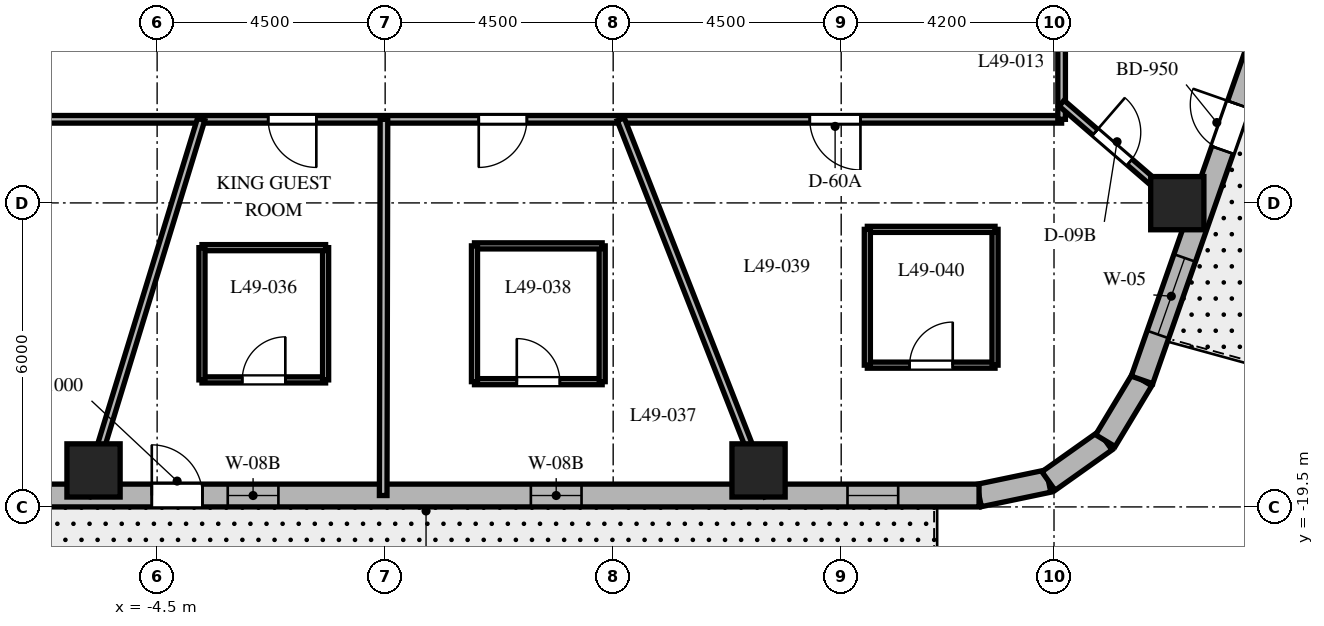
"""IFC4 building model, lengths in metres.
Left out: names, types, materials, properties, quantities, classifications, styles, units other than length and angle.
Written with IfcOpenShell. Run it as: python <this file> out.ifc"""

import sys

from ifc_helpers import new_model, si_unit, direction, frame, frame_2d, origin, origin_2d, place, context, subcontext, project, spatial, rectangle, extrude, element, fill, save


model = new_model("IFC4")
c1 = context("Model", 3, precision=1e-05, world=origin(), true_north=direction((0.0, 1.0)))
c2 = subcontext(c1, "Body", "Model", "MODEL_VIEW")
j1 = project(units=[si_unit("LENGTHUNIT", "METRE"), si_unit("PLANEANGLEUNIT", "RADIAN")], contexts=[c1])
p1 = place(None, origin())
s1 = spatial("IfcSite", under=j1, at=p1, CompositionType="ELEMENT")
p2 = place(p1, origin())
s2 = spatial("IfcBuilding", under=s1, at=p2, CompositionType="ELEMENT")
p3 = place(p2, frame((0.0, 0.0, 197.8)))
s3 = spatial("IfcBuildingStorey", under=s2, at=p3, CompositionType="ELEMENT", Elevation=197.8)
for number, where, z_axis, x_axis in (
    (1, (-5.755, -18.78, 0.0), (0.0, 0.0, 1.0), (1.0, 0.0, 0.0)),
    (2, (7.369, -18.78, 0.0), (0.0, 0.0, 1.0), (1.0, 0.0, 0.0)),
    (3, (15.633, -13.505, 0.0), (0.0, 0.0, 1.0), (1.0, 0.0, 0.0)),
):
    element("IfcColumn", number, at=place(p3, frame(where, z_axis=z_axis, x_axis=x_axis)), inside=s3, PredefinedType="COLUMN", context=c2, shape_type="SweptSolid", body=[
        extrude(rectangle(XDim=1.05, YDim=1.05, at=origin_2d()), origin(), (0.0, 0.0, 1.0), 3.7),
    ])
p4 = place(p3, frame((11.72, -19.275, 0.0), z_axis=(0.0, 0.0, 1.0), x_axis=(0.97893106758, 0.204191001093, 0.0)))
e4 = element("IfcWall", 4, at=p4, inside=s3, PredefinedType="SOLIDWALL", context=c2, shape_type="SweptSolid", body=[
    extrude(rectangle(XDim=1.4, YDim=0.45, at=frame_2d((0.7, 0.0))), origin(), (0.0, 0.0, 1.0), 3.35),
])
p5 = place(p3, frame((13.091, -18.989, 0.0), z_axis=(0.0, 0.0, 1.0), x_axis=(0.815574637848, 0.578651890258, 0.0)))
e5 = element("IfcWall", 5, at=p5, inside=s3, PredefinedType="SOLIDWALL", context=c2, shape_type="SweptSolid", body=[
    extrude(rectangle(XDim=1.377, YDim=0.45, at=frame_2d((0.688, 0.0))), origin(), (0.0, 0.0, 1.0), 3.35),
])
p6 = place(p3, frame((14.214, -18.192, 0.0), z_axis=(0.0, 0.0, 1.0), x_axis=(0.516340945502, 0.856383108193, 0.0)))
e6 = element("IfcWall", 6, at=p6, inside=s3, PredefinedType="SOLIDWALL", context=c2, shape_type="SweptSolid", body=[
    extrude(rectangle(XDim=1.4, YDim=0.45, at=frame_2d((0.7, 0.0))), origin(), (0.0, 0.0, 1.0), 3.35),
])
p7 = place(p3, frame((-10.108, -19.275, 0.0), z_axis=(0.0, 0.0, 1.0), x_axis=(1.0, 0.0, 0.0)))
e7 = element("IfcWall", 7, at=p7, inside=s3, PredefinedType="SOLIDWALL", context=c2, shape_type="SweptSolid", body=[
    extrude(rectangle(XDim=21.829, YDim=0.45, at=frame_2d((10.915, 0.0))), origin(), (0.0, 0.0, 1.0), 3.35),
])
p8 = place(p7, frame((5.503, 0.0, 0.0)))
e8 = element("IfcOpeningElement", 8, at=p8, cuts=e7, PredefinedType="OPENING", context=c2, shape_type="SweptSolid", body=[
    extrude(rectangle(XDim=1.0, YDim=2.15, at=frame_2d((0.5, 1.075))), frame((0.0, 0.235, 0.0), z_axis=(0.0, -1.0, 0.0), x_axis=(1.0, 0.0, 0.0)), (0.0, 0.0, 1.0), 0.47),
])
p9 = place(p7, frame((1.597, 0.0, 0.8)))
e9 = element("IfcOpeningElement", 9, at=p9, cuts=e7, PredefinedType="OPENING", context=c2, shape_type="SweptSolid", body=[
    extrude(rectangle(XDim=1.0, YDim=1.35, at=frame_2d((0.5, 0.675))), frame((0.0, 0.235, 0.0), z_axis=(0.0, -1.0, 0.0), x_axis=(1.0, 0.0, 0.0)), (0.0, 0.0, 1.0), 0.47),
])
p10 = place(p7, frame((7.002, 0.0, 0.8)))
e10 = element("IfcOpeningElement", 10, at=p10, cuts=e7, PredefinedType="OPENING", context=c2, shape_type="SweptSolid", body=[
    extrude(rectangle(XDim=1.0, YDim=1.35, at=frame_2d((0.5, 0.675))), frame((0.0, 0.235, 0.0), z_axis=(0.0, -1.0, 0.0), x_axis=(1.0, 0.0, 0.0)), (0.0, 0.0, 1.0), 0.47),
])
p11 = place(p7, frame((12.984, 0.0, 0.8)))
e11 = element("IfcOpeningElement", 11, at=p11, cuts=e7, PredefinedType="OPENING", context=c2, shape_type="SweptSolid", body=[
    extrude(rectangle(XDim=1.0, YDim=1.35, at=frame_2d((0.5, 0.675))), frame((0.0, 0.235, 0.0), z_axis=(0.0, -1.0, 0.0), x_axis=(1.0, 0.0, 0.0)), (0.0, 0.0, 1.0), 0.47),
])
p12 = place(p7, frame((19.233, 0.0, 0.8)))
e12 = element("IfcOpeningElement", 12, at=p12, cuts=e7, PredefinedType="OPENING", context=c2, shape_type="SweptSolid", body=[
    extrude(rectangle(XDim=1.0, YDim=1.35, at=frame_2d((0.5, 0.675))), frame((0.0, 0.235, 0.0), z_axis=(0.0, -1.0, 0.0), x_axis=(1.0, 0.0, 0.0)), (0.0, 0.0, 1.0), 0.47),
])
p13 = place(p3, frame((14.937, -16.993, 0.0), z_axis=(0.0, 0.0, 1.0), x_axis=(0.330431575061, 0.943829949834, 0.0)))
e13 = element("IfcWall", 13, at=p13, inside=s3, PredefinedType="SOLIDWALL", context=c2, shape_type="SweptSolid", body=[
    extrude(rectangle(XDim=17.689, YDim=0.45, at=frame_2d((8.844, 0.0))), origin(), (0.0, 0.0, 1.0), 3.35),
])
p14 = place(p13, frame((4.807, 0.0, 0.0)))
e14 = element("IfcOpeningElement", 14, at=p14, cuts=e13, PredefinedType="OPENING", context=c2, shape_type="SweptSolid", body=[
    extrude(rectangle(XDim=0.95, YDim=2.15, at=frame_2d((0.475, 1.075))), frame((0.0, 0.235, 0.0), z_axis=(0.0, -1.0, 0.0), x_axis=(1.0, 0.0, 0.0)), (0.0, 0.0, 1.0), 0.47),
])
p15 = place(p13, frame((0.95, 0.0, 0.8)))
e15 = element("IfcOpeningElement", 15, at=p15, cuts=e13, PredefinedType="OPENING", context=c2, shape_type="SweptSolid", body=[
    extrude(rectangle(XDim=1.6, YDim=1.75, at=frame_2d((0.8, 0.875))), frame((0.0, 0.235, 0.0), z_axis=(0.0, -1.0, 0.0), x_axis=(1.0, 0.0, 0.0)), (0.0, 0.0, 1.0), 0.47),
])
p16 = place(p13, frame((7.99, 0.0, 0.8)))
e16 = element("IfcOpeningElement", 16, at=p16, cuts=e13, PredefinedType="OPENING", context=c2, shape_type="SweptSolid", body=[
    extrude(rectangle(XDim=1.6, YDim=1.75, at=frame_2d((0.8, 0.875))), frame((0.0, 0.235, 0.0), z_axis=(0.0, -1.0, 0.0), x_axis=(1.0, 0.0, 0.0)), (0.0, 0.0, 1.0), 0.47),
])
p17 = place(p13, frame((15.084, 0.0, 0.8)))
e17 = element("IfcOpeningElement", 17, at=p17, cuts=e13, PredefinedType="OPENING", context=c2, shape_type="SweptSolid", body=[
    extrude(rectangle(XDim=1.6, YDim=1.75, at=frame_2d((0.8, 0.875))), frame((0.0, 0.235, 0.0), z_axis=(0.0, -1.0, 0.0), x_axis=(1.0, 0.0, 0.0)), (0.0, 0.0, 1.0), 0.47),
])
p18 = place(p3, frame((13.35, -11.85, 0.0), z_axis=(0.0, 0.0, 1.0), x_axis=(-1.0, 0.0, 0.0)))
e18 = element("IfcWall", 18, at=p18, inside=s3, PredefinedType="PARTITIONING", context=c2, shape_type="SweptSolid", body=[
    extrude(rectangle(XDim=26.7, YDim=0.15, at=frame_2d((13.35, 0.0))), origin(), (0.0, 0.0, 1.0), 2.14),
])
p19 = place(p18, frame((20.682, 0.0, 0.0)))
e19 = element("IfcOpeningElement", 19, at=p19, cuts=e18, PredefinedType="OPENING", context=c2, shape_type="SweptSolid", body=[
    extrude(rectangle(XDim=0.95, YDim=2.03, at=frame_2d((0.475, 1.015))), frame((0.0, 0.085, 0.0), z_axis=(0.0, -1.0, 0.0), x_axis=(1.0, 0.0, 0.0)), (0.0, 0.0, 1.0), 0.17),
])
p20 = place(p18, frame((14.708, 0.0, 0.0)))
e20 = element("IfcOpeningElement", 20, at=p20, cuts=e18, PredefinedType="OPENING", context=c2, shape_type="SweptSolid", body=[
    extrude(rectangle(XDim=0.95, YDim=2.03, at=frame_2d((0.475, 1.015))), frame((0.0, 0.085, 0.0), z_axis=(0.0, -1.0, 0.0), x_axis=(1.0, 0.0, 0.0)), (0.0, 0.0, 1.0), 0.17),
])
p21 = place(p18, frame((10.553, 0.0, 0.0)))
e21 = element("IfcOpeningElement", 21, at=p21, cuts=e18, PredefinedType="OPENING", context=c2, shape_type="SweptSolid", body=[
    extrude(rectangle(XDim=0.95, YDim=2.03, at=frame_2d((0.475, 1.015))), frame((0.0, 0.085, 0.0), z_axis=(0.0, -1.0, 0.0), x_axis=(1.0, 0.0, 0.0)), (0.0, 0.0, 1.0), 0.17),
])
p22 = place(p18, frame((3.97, 0.0, 0.0)))
e22 = element("IfcOpeningElement", 22, at=p22, cuts=e18, PredefinedType="OPENING", context=c2, shape_type="SweptSolid", body=[
    extrude(rectangle(XDim=1.0, YDim=2.03, at=frame_2d((0.5, 1.015))), frame((0.0, 0.085, 0.0), z_axis=(0.0, -1.0, 0.0), x_axis=(1.0, 0.0, 0.0)), (0.0, 0.0, 1.0), 0.17),
])
p23 = place(p3, frame((13.35, 11.85, 0.0), z_axis=(0.0, 0.0, 1.0), x_axis=(0.0, -1.0, 0.0)))
e23 = element("IfcWall", 23, at=p23, inside=s3, PredefinedType="PARTITIONING", context=c2, shape_type="SweptSolid", body=[
    extrude(rectangle(XDim=23.7, YDim=0.15, at=frame_2d((11.85, 0.0))), origin(), (0.0, 0.0, 1.0), 2.79),
])
p24 = place(p23, frame((9.424, 0.0, 0.0)))
e24 = element("IfcOpeningElement", 24, at=p24, cuts=e23, PredefinedType="OPENING", context=c2, shape_type="SweptSolid", body=[
    extrude(rectangle(XDim=0.95, YDim=2.03, at=frame_2d((0.475, 1.015))), frame((0.0, 0.085, 0.0), z_axis=(0.0, -1.0, 0.0), x_axis=(1.0, 0.0, 0.0)), (0.0, 0.0, 1.0), 0.17),
])
p25 = place(p23, frame((3.765, 0.0, 0.0)))
e25 = element("IfcOpeningElement", 25, at=p25, cuts=e23, PredefinedType="OPENING", context=c2, shape_type="SweptSolid", body=[
    extrude(rectangle(XDim=0.9, YDim=2.03, at=frame_2d((0.45, 1.015))), frame((0.0, 0.085, 0.0), z_axis=(0.0, -1.0, 0.0), x_axis=(1.0, 0.0, 0.0)), (0.0, 0.0, 1.0), 0.17),
])
p26 = place(p23, frame((12.494, 0.0, 0.0)))
e26 = element("IfcOpeningElement", 26, at=p26, cuts=e23, PredefinedType="OPENING", context=c2, shape_type="SweptSolid", body=[
    extrude(rectangle(XDim=0.9, YDim=2.03, at=frame_2d((0.45, 1.015))), frame((0.0, 0.085, 0.0), z_axis=(0.0, -1.0, 0.0), x_axis=(1.0, 0.0, 0.0)), (0.0, 0.0, 1.0), 0.17),
])
p27 = place(p3, frame((-3.631, -11.85, 0.0), z_axis=(0.0, 0.0, 1.0), x_axis=(-0.293007573338, -0.956110120209, 0.0)))
e27 = element("IfcWall", 27, at=p27, inside=s3, PredefinedType="PARTITIONING", context=c2, shape_type="SweptSolid", body=[
    extrude(rectangle(XDim=7.766, YDim=0.15, at=frame_2d((3.883, 0.0))), origin(), (0.0, 0.0, 1.0), 2.14),
])
p28 = place(p3, frame((-0.024, -11.85, 0.0), z_axis=(0.0, 0.0, 1.0), x_axis=(-0.001972901592, -0.999998053828, 0.0)))
e28 = element("IfcWall", 28, at=p28, inside=s3, PredefinedType="PARTITIONING", context=c2, shape_type="SweptSolid", body=[
    extrude(rectangle(XDim=7.425, YDim=0.15, at=frame_2d((3.712, 0.0))), origin(), (0.0, 0.0, 1.0), 2.59),
])
p29 = place(p3, frame((4.65, -11.85, 0.0), z_axis=(0.0, 0.0, 1.0), x_axis=(0.365265947993, -0.930903210456, 0.0)))
e29 = element("IfcWall", 29, at=p29, inside=s3, PredefinedType="PARTITIONING", context=c2, shape_type="SweptSolid", body=[
    extrude(rectangle(XDim=7.976, YDim=0.15, at=frame_2d((3.988, 0.0))), origin(), (0.0, 0.0, 1.0), 2.14),
])
p30 = place(p3, frame((13.35, -11.533, 0.0), z_axis=(0.0, 0.0, 1.0), x_axis=(0.756711647314, -0.65374879183, 0.0)))
e30 = element("IfcWall", 30, at=p30, inside=s3, PredefinedType="PARTITIONING", context=c2, shape_type="SweptSolid", body=[
    extrude(rectangle(XDim=3.55, YDim=0.15, at=frame_2d((1.775, 0.0))), origin(), (0.0, 0.0, 1.0), 2.59),
])
p31 = place(p30, frame((0.875, 0.0, 0.0)))
e31 = element("IfcOpeningElement", 31, at=p31, cuts=e30, PredefinedType="OPENING", context=c2, shape_type="SweptSolid", body=[
    extrude(rectangle(XDim=0.9, YDim=2.03, at=frame_2d((0.45, 1.015))), frame((0.0, 0.085, 0.0), z_axis=(0.0, -1.0, 0.0), x_axis=(1.0, 0.0, 0.0)), (0.0, 0.0, 1.0), 0.17),
])
p32 = place(p3, frame((-3.615, -16.993, 0.0), z_axis=(0.0, 0.0, 1.0), x_axis=(1.0, 0.0, 0.0)))
e32 = element("IfcWall", 32, at=p32, inside=s3, PredefinedType="PARTITIONING", context=c2, shape_type="SweptSolid", body=[
    extrude(rectangle(XDim=2.44, YDim=0.12, at=frame_2d((1.22, 0.0))), origin(), (0.0, 0.0, 1.0), 3.35),
])
p33 = place(p32, frame((0.795, 0.0, 0.0)))
e33 = element("IfcOpeningElement", 33, at=p33, cuts=e32, PredefinedType="OPENING", context=c2, shape_type="SweptSolid", body=[
    extrude(rectangle(XDim=0.85, YDim=2.03, at=frame_2d((0.425, 1.015))), frame((0.0, 0.07, 0.0), z_axis=(0.0, -1.0, 0.0), x_axis=(1.0, 0.0, 0.0)), (0.0, 0.0, 1.0), 0.14),
])
p34 = place(p3, frame((-1.175, -16.993, 0.0), z_axis=(0.0, 0.0, 1.0), x_axis=(0.0, 1.0, 0.0)))
e34 = element("IfcWall", 34, at=p34, inside=s3, PredefinedType="PARTITIONING", context=c2, shape_type="SweptSolid", body=[
    extrude(rectangle(XDim=2.61, YDim=0.12, at=frame_2d((1.305, 0.0))), origin(), (0.0, 0.0, 1.0), 2.791),
])
p35 = place(p3, frame((-1.175, -14.383, 0.0), z_axis=(0.0, 0.0, 1.0), x_axis=(-1.0, 0.0, 0.0)))
e35 = element("IfcWall", 35, at=p35, inside=s3, PredefinedType="PARTITIONING", context=c2, shape_type="SweptSolid", body=[
    extrude(rectangle(XDim=2.44, YDim=0.12, at=frame_2d((1.22, 0.0))), origin(), (0.0, 0.0, 1.0), 3.35),
])
p36 = place(p3, frame((-3.615, -14.383, 0.0), z_axis=(0.0, 0.0, 1.0), x_axis=(0.0, -1.0, 0.0)))
e36 = element("IfcWall", 36, at=p36, inside=s3, PredefinedType="PARTITIONING", context=c2, shape_type="SweptSolid", body=[
    extrude(rectangle(XDim=2.61, YDim=0.12, at=frame_2d((1.305, 0.0))), origin(), (0.0, 0.0, 1.0), 2.791),
])
p37 = place(p3, frame((1.763, -17.028, 0.0), z_axis=(0.0, 0.0, 1.0), x_axis=(1.0, 0.0, 0.0)))
e37 = element("IfcWall", 37, at=p37, inside=s3, PredefinedType="PARTITIONING", context=c2, shape_type="SweptSolid", body=[
    extrude(rectangle(XDim=2.52, YDim=0.12, at=frame_2d((1.26, 0.0))), origin(), (0.0, 0.0, 1.0), 2.14),
])
p38 = place(p37, frame((0.835, 0.0, 0.0)))
e38 = element("IfcOpeningElement", 38, at=p38, cuts=e37, PredefinedType="OPENING", context=c2, shape_type="SweptSolid", body=[
    extrude(rectangle(XDim=0.85, YDim=2.03, at=frame_2d((0.425, 1.015))), frame((0.0, 0.07, 0.0), z_axis=(0.0, -1.0, 0.0), x_axis=(1.0, 0.0, 0.0)), (0.0, 0.0, 1.0), 0.14),
])
p39 = place(p3, frame((4.283, -17.028, 0.0), z_axis=(0.0, 0.0, 1.0), x_axis=(0.0, 1.0, 0.0)))
e39 = element("IfcWall", 39, at=p39, inside=s3, PredefinedType="PARTITIONING", context=c2, shape_type="SweptSolid", body=[
    extrude(rectangle(XDim=2.68, YDim=0.12, at=frame_2d((1.34, 0.0))), origin(), (0.0, 0.0, 1.0), 2.14),
])
p40 = place(p3, frame((4.283, -14.348, 0.0), z_axis=(0.0, 0.0, 1.0), x_axis=(-1.0, 0.0, 0.0)))
e40 = element("IfcWall", 40, at=p40, inside=s3, PredefinedType="PARTITIONING", context=c2, shape_type="SweptSolid", body=[
    extrude(rectangle(XDim=2.52, YDim=0.12, at=frame_2d((1.26, 0.0))), origin(), (0.0, 0.0, 1.0), 2.14),
])
p41 = place(p3, frame((1.763, -14.348, 0.0), z_axis=(0.0, 0.0, 1.0), x_axis=(0.0, -1.0, 0.0)))
e41 = element("IfcWall", 41, at=p41, inside=s3, PredefinedType="PARTITIONING", context=c2, shape_type="SweptSolid", body=[
    extrude(rectangle(XDim=2.68, YDim=0.12, at=frame_2d((1.34, 0.0))), origin(), (0.0, 0.0, 1.0), 2.791),
])
p42 = place(p3, frame((9.516, -16.702, 0.0), z_axis=(0.0, 0.0, 1.0), x_axis=(1.0, 0.0, 0.0)))
e42 = element("IfcWall", 42, at=p42, inside=s3, PredefinedType="PARTITIONING", context=c2, shape_type="SweptSolid", body=[
    extrude(rectangle(XDim=2.52, YDim=0.12, at=frame_2d((1.26, 0.0))), origin(), (0.0, 0.0, 1.0), 2.59),
])
p43 = place(p42, frame((0.835, 0.0, 0.0)))
e43 = element("IfcOpeningElement", 43, at=p43, cuts=e42, PredefinedType="OPENING", context=c2, shape_type="SweptSolid", body=[
    extrude(rectangle(XDim=0.85, YDim=2.03, at=frame_2d((0.425, 1.015))), frame((0.0, 0.07, 0.0), z_axis=(0.0, -1.0, 0.0), x_axis=(1.0, 0.0, 0.0)), (0.0, 0.0, 1.0), 0.14),
])
p44 = place(p3, frame((12.036, -16.702, 0.0), z_axis=(0.0, 0.0, 1.0), x_axis=(0.0, 1.0, 0.0)))
e44 = element("IfcWall", 44, at=p44, inside=s3, PredefinedType="PARTITIONING", context=c2, shape_type="SweptSolid", body=[
    extrude(rectangle(XDim=2.68, YDim=0.12, at=frame_2d((1.34, 0.0))), origin(), (0.0, 0.0, 1.0), 2.59),
])
p45 = place(p3, frame((12.036, -14.022, 0.0), z_axis=(0.0, 0.0, 1.0), x_axis=(-1.0, 0.0, 0.0)))
e45 = element("IfcWall", 45, at=p45, inside=s3, PredefinedType="PARTITIONING", context=c2, shape_type="SweptSolid", body=[
    extrude(rectangle(XDim=2.52, YDim=0.12, at=frame_2d((1.26, 0.0))), origin(), (0.0, 0.0, 1.0), 2.876),
])
p46 = place(p3, frame((9.516, -14.022, 0.0), z_axis=(0.0, 0.0, 1.0), x_axis=(0.0, -1.0, 0.0)))
e46 = element("IfcWall", 46, at=p46, inside=s3, PredefinedType="PARTITIONING", context=c2, shape_type="SweptSolid", body=[
    extrude(rectangle(XDim=2.68, YDim=0.12, at=frame_2d((1.34, 0.0))), origin(), (0.0, 0.0, 1.0), 2.876),
])
p47 = place(p8, origin())
e47 = element("IfcDoor", 47, at=p47, inside=s3, OperationType="SINGLE_SWING_LEFT", PredefinedType="DOOR", context=c2, shape_type="SweptSolid", body=[
    extrude(rectangle(XDim=1.0, YDim=2.15, at=frame_2d((0.5, 1.075))), frame((0.0, 0.025, 0.0), z_axis=(0.0, -1.0, 0.0), x_axis=(1.0, 0.0, 0.0)), (0.0, 0.0, 1.0), 0.05),
])
fill(e8, e47)
p48 = place(p10, origin())
e48 = element("IfcWindow", 48, at=p48, inside=s3, PartitioningType="SINGLE_PANEL", PredefinedType="WINDOW", context=c2, shape_type="SweptSolid", body=[
    extrude(rectangle(XDim=1.0, YDim=1.35, at=frame_2d((0.5, 0.675))), frame((0.0, 0.03, 0.0), z_axis=(0.0, -1.0, 0.0), x_axis=(1.0, 0.0, 0.0)), (0.0, 0.0, 1.0), 0.06),
])
fill(e10, e48)
p49 = place(p11, origin())
e49 = element("IfcWindow", 49, at=p49, inside=s3, PartitioningType="SINGLE_PANEL", PredefinedType="WINDOW", context=c2, shape_type="SweptSolid", body=[
    extrude(rectangle(XDim=1.0, YDim=1.35, at=frame_2d((0.5, 0.675))), frame((0.0, 0.03, 0.0), z_axis=(0.0, -1.0, 0.0), x_axis=(1.0, 0.0, 0.0)), (0.0, 0.0, 1.0), 0.06),
])
fill(e11, e49)
p50 = place(p12, origin())
e50 = element("IfcWindow", 50, at=p50, inside=s3, PartitioningType="SINGLE_PANEL", PredefinedType="WINDOW", context=c2, shape_type="SweptSolid", body=[
    extrude(rectangle(XDim=1.0, YDim=1.35, at=frame_2d((0.5, 0.675))), frame((0.0, 0.03, 0.0), z_axis=(0.0, -1.0, 0.0), x_axis=(1.0, 0.0, 0.0)), (0.0, 0.0, 1.0), 0.06),
])
fill(e12, e50)
p51 = place(p14, origin())
e51 = element("IfcDoor", 51, at=p51, inside=s3, OperationType="SINGLE_SWING_RIGHT", PredefinedType="DOOR", context=c2, shape_type="SweptSolid", body=[
    extrude(rectangle(XDim=0.95, YDim=2.15, at=frame_2d((0.475, 1.075))), frame((0.0, 0.025, 0.0), z_axis=(0.0, -1.0, 0.0), x_axis=(1.0, 0.0, 0.0)), (0.0, 0.0, 1.0), 0.05),
])
fill(e14, e51)
p52 = place(p15, origin())
e52 = element("IfcWindow", 52, at=p52, inside=s3, PartitioningType="SINGLE_PANEL", PredefinedType="WINDOW", context=c2, shape_type="SweptSolid", body=[
    extrude(rectangle(XDim=1.6, YDim=1.75, at=frame_2d((0.8, 0.875))), frame((0.0, 0.03, 0.0), z_axis=(0.0, -1.0, 0.0), x_axis=(1.0, 0.0, 0.0)), (0.0, 0.0, 1.0), 0.06),
])
fill(e15, e52)
p53 = place(p20, origin())
e53 = element("IfcDoor", 53, at=p53, inside=s3, OperationType="SINGLE_SWING_LEFT", PredefinedType="DOOR", context=c2, shape_type="SweptSolid", body=[
    extrude(rectangle(XDim=0.95, YDim=2.03, at=frame_2d((0.475, 1.015))), frame((0.0, 0.025, 0.0), z_axis=(0.0, -1.0, 0.0), x_axis=(1.0, 0.0, 0.0)), (0.0, 0.0, 1.0), 0.05),
])
fill(e20, e53)
p54 = place(p33, origin())
e54 = element("IfcDoor", 54, at=p54, inside=s3, OperationType="SINGLE_SWING_RIGHT", PredefinedType="DOOR", context=c2, shape_type="SweptSolid", body=[
    extrude(rectangle(XDim=0.85, YDim=2.03, at=frame_2d((0.425, 1.015))), frame((0.0, 0.025, 0.0), z_axis=(0.0, -1.0, 0.0), x_axis=(1.0, 0.0, 0.0)), (0.0, 0.0, 1.0), 0.05),
])
fill(e33, e54)
p55 = place(p21, origin())
e55 = element("IfcDoor", 55, at=p55, inside=s3, OperationType="SINGLE_SWING_RIGHT", PredefinedType="DOOR", context=c2, shape_type="SweptSolid", body=[
    extrude(rectangle(XDim=0.95, YDim=2.03, at=frame_2d((0.475, 1.015))), frame((0.0, 0.025, 0.0), z_axis=(0.0, -1.0, 0.0), x_axis=(1.0, 0.0, 0.0)), (0.0, 0.0, 1.0), 0.05),
])
fill(e21, e55)
p56 = place(p38, origin())
e56 = element("IfcDoor", 56, at=p56, inside=s3, OperationType="SINGLE_SWING_LEFT", PredefinedType="DOOR", context=c2, shape_type="SweptSolid", body=[
    extrude(rectangle(XDim=0.85, YDim=2.03, at=frame_2d((0.425, 1.015))), frame((0.0, 0.025, 0.0), z_axis=(0.0, -1.0, 0.0), x_axis=(1.0, 0.0, 0.0)), (0.0, 0.0, 1.0), 0.05),
])
fill(e38, e56)
p57 = place(p22, origin())
e57 = element("IfcDoor", 57, at=p57, inside=s3, OperationType="SINGLE_SWING_LEFT", PredefinedType="DOOR", context=c2, shape_type="SweptSolid", body=[
    extrude(rectangle(XDim=1.0, YDim=2.03, at=frame_2d((0.5, 1.015))), frame((0.0, 0.025, 0.0), z_axis=(0.0, -1.0, 0.0), x_axis=(1.0, 0.0, 0.0)), (0.0, 0.0, 1.0), 0.05),
])
fill(e22, e57)
p58 = place(p31, origin())
e58 = element("IfcDoor", 58, at=p58, inside=s3, OperationType="SINGLE_SWING_LEFT", PredefinedType="DOOR", context=c2, shape_type="SweptSolid", body=[
    extrude(rectangle(XDim=0.9, YDim=2.03, at=frame_2d((0.45, 1.015))), frame((0.0, 0.025, 0.0), z_axis=(0.0, -1.0, 0.0), x_axis=(1.0, 0.0, 0.0)), (0.0, 0.0, 1.0), 0.05),
])
fill(e31, e58)
p59 = place(p43, origin())
e59 = element("IfcDoor", 59, at=p59, inside=s3, OperationType="SINGLE_SWING_RIGHT", PredefinedType="DOOR", context=c2, shape_type="SweptSolid", body=[
    extrude(rectangle(XDim=0.85, YDim=2.03, at=frame_2d((0.425, 1.015))), frame((0.0, 0.025, 0.0), z_axis=(0.0, -1.0, 0.0), x_axis=(1.0, 0.0, 0.0)), (0.0, 0.0, 1.0), 0.05),
])
fill(e43, e59)
save(model, sys.argv[1])
